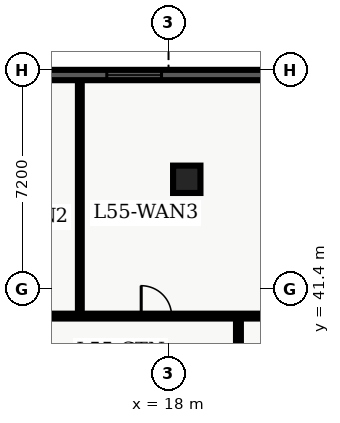
"""IFC4 building model, lengths in metres.
Left out: names, types, materials, properties, quantities, classifications, styles, units other than length and angle.
Written with IfcOpenShell. Run it as: python <this file> out.ifc"""

import sys

from ifc_helpers import new_model, entity, si_unit, converted_unit, direction, frame, origin_with_axes, origin_2d_with_axis, place, context, subcontext, project, spatial, polyline, rectangle, outline, extrude, element, fill, save


model = new_model("IFC4")
c1 = context("Model", 3, precision=1e-05, world=origin_with_axes(), true_north=direction((0.0, 1.0)))
c2 = subcontext(c1, "Body", "Model", "MODEL_VIEW")
j1 = project(units=[si_unit("LENGTHUNIT", "METRE"), converted_unit("PLANEANGLEUNIT", "DEGREE", entity("IfcPlaneAngleMeasure", 0.017), si_unit("PLANEANGLEUNIT", "RADIAN"), dimensions=[0, 0, 0, 0, 0, 0, 0])], contexts=[c1])
p1 = place(None, origin_with_axes())
s1 = spatial("IfcSite", under=j1, at=p1, CompositionType="ELEMENT")
p2 = place(p1, origin_with_axes())
s2 = spatial("IfcBuilding", under=s1, at=p2, CompositionType="ELEMENT")
p3 = place(p2, frame((0.0, 0.0, 224.7), z_axis=(0.0, 0.0, 1.0), x_axis=(1.0, 0.0, 0.0)))
s3 = spatial("IfcBuildingStorey", under=s2, at=p3, CompositionType="ELEMENT", Elevation=224.7)
p4 = place(p3, frame((18.6, 45.0, 0.0), z_axis=(0.0, 0.0, 1.0), x_axis=(1.0, 0.0, 0.0)))
e1 = element("IfcColumn", 1, at=p4, inside=s3, PredefinedType="COLUMN", context=c2, shape_type="SweptSolid", body=[
    extrude(rectangle(XDim=0.9, YDim=0.9, at=origin_2d_with_axis()), origin_with_axes(), (0.0, 0.0, 1.0), 3.9),
])
p5 = place(p3, frame((7.1, 40.5, 0.0), z_axis=(0.0, 0.0, 1.0), x_axis=(1.0, 0.0, 0.0)))
e2 = element("IfcWall", 2, at=p5, inside=s3, PredefinedType="PARTITIONING", context=c2, shape_type="SweptSolid", body=[
    extrude(outline(polyline([(0.0, -0.08), (24.965, -0.08), (24.965, 0.08), (0.0, 0.08), (0.0, -0.08)])), origin_with_axes(), (0.0, 0.0, 1.0), 2.7),
])
p6 = place(p5, frame((3.093, 0.0, 0.0), z_axis=(0.0, 0.0, 1.0), x_axis=(1.0, 0.0, 0.0)))
e3 = element("IfcOpeningElement", 3, at=p6, cuts=e2, PredefinedType="OPENING", context=c2, shape_type="SweptSolid", body=[
    extrude(rectangle(XDim=1.0, YDim=0.18, at=origin_2d_with_axis()), origin_with_axes(), (0.0, 0.0, 1.0), 2.15),
])
p7 = place(p5, frame((5.873, 0.0, 0.0), z_axis=(0.0, 0.0, 1.0), x_axis=(1.0, 0.0, 0.0)))
e4 = element("IfcOpeningElement", 4, at=p7, cuts=e2, PredefinedType="OPENING", context=c2, shape_type="SweptSolid", body=[
    extrude(rectangle(XDim=1.0, YDim=0.18, at=origin_2d_with_axis()), origin_with_axes(), (0.0, 0.0, 1.0), 2.15),
])
p8 = place(p5, frame((10.502, 0.0, 0.0), z_axis=(0.0, 0.0, 1.0), x_axis=(1.0, 0.0, 0.0)))
e5 = element("IfcOpeningElement", 5, at=p8, cuts=e2, PredefinedType="OPENING", context=c2, shape_type="SweptSolid", body=[
    extrude(rectangle(XDim=1.0, YDim=0.18, at=origin_2d_with_axis()), origin_with_axes(), (0.0, 0.0, 1.0), 2.15),
])
p9 = place(p3, frame((20.3, 7.8, 0.0), z_axis=(0.0, 0.0, 1.0), x_axis=(0.0, 1.0, 0.0)))
e6 = element("IfcWall", 6, at=p9, inside=s3, PredefinedType="PARTITIONING", context=c2, shape_type="SweptSolid", body=[
    extrude(outline(polyline([(0.0, -0.08), (32.7, -0.08), (32.7, 0.08), (0.0, 0.08), (0.0, -0.08)])), origin_with_axes(), (0.0, 0.0, 1.0), 2.7),
])
p10 = place(p9, frame((22.042, 0.0, 0.0), z_axis=(0.0, 0.0, 1.0), x_axis=(1.0, 0.0, 0.0)))
e7 = element("IfcOpeningElement", 7, at=p10, cuts=e6, PredefinedType="OPENING", context=c2, shape_type="SweptSolid", body=[
    extrude(rectangle(XDim=1.0, YDim=0.18, at=origin_2d_with_axis()), origin_with_axes(), (0.0, 0.0, 1.0), 2.15),
])
p11 = place(p9, frame((27.562, 0.0, 0.0), z_axis=(0.0, 0.0, 1.0), x_axis=(1.0, 0.0, 0.0)))
e8 = element("IfcOpeningElement", 8, at=p11, cuts=e6, PredefinedType="OPENING", context=c2, shape_type="SweptSolid", body=[
    extrude(rectangle(XDim=1.0, YDim=0.18, at=origin_2d_with_axis()), origin_with_axes(), (0.0, 0.0, 1.0), 2.15),
])
p12 = place(p9, frame((5.775, 0.0, 0.0), z_axis=(0.0, 0.0, 1.0), x_axis=(1.0, 0.0, 0.0)))
e9 = element("IfcOpeningElement", 9, at=p12, cuts=e6, PredefinedType="OPENING", context=c2, shape_type="SweptSolid", body=[
    extrude(rectangle(XDim=1.05, YDim=0.18, at=origin_2d_with_axis()), origin_with_axes(), (0.0, 0.0, 1.0), 2.15),
])
p13 = place(p3, frame((15.083, 40.6, 0.0), z_axis=(0.0, 0.0, 1.0), x_axis=(0.0, 1.0, 0.0)))
e10 = element("IfcWall", 10, at=p13, inside=s3, PredefinedType="PARTITIONING", context=c2, shape_type="SweptSolid", body=[
    extrude(outline(polyline([(0.0, -0.062), (7.665, -0.062), (7.665, 0.062), (0.0, 0.062), (0.0, -0.062)])), origin_with_axes(), (0.0, 0.0, 1.0), 2.7),
])
p14 = place(p3, frame((7.24, 48.43, 0.0), z_axis=(0.0, 0.0, 1.0), x_axis=(1.0, 0.0, 0.0)))
e11 = element("IfcWall", 11, at=p14, inside=s3, PredefinedType="SOLIDWALL", context=c2, shape_type="SweptSolid", body=[
    extrude(outline(polyline([(0.0, -0.17), (18.36, -0.17), (18.36, 0.17), (0.0, 0.17), (0.0, -0.17)])), origin_with_axes(), (0.0, 0.0, 1.0), 3.66),
])
p15 = place(p14, frame((9.63, 0.0, 0.45), z_axis=(0.0, 0.0, 1.0), x_axis=(1.0, 0.0, 0.0)))
e12 = element("IfcOpeningElement", 12, at=p15, cuts=e11, PredefinedType="OPENING", context=c2, shape_type="SweptSolid", body=[
    extrude(rectangle(XDim=1.8, YDim=0.36, at=origin_2d_with_axis()), origin_with_axes(), (0.0, 0.0, 1.0), 2.1),
])
p16 = place(p14, frame((14.9, 0.0, 0.45), z_axis=(0.0, 0.0, 1.0), x_axis=(1.0, 0.0, 0.0)))
e13 = element("IfcOpeningElement", 13, at=p16, cuts=e11, PredefinedType="OPENING", context=c2, shape_type="SweptSolid", body=[
    extrude(rectangle(XDim=1.8, YDim=0.36, at=origin_2d_with_axis()), origin_with_axes(), (0.0, 0.0, 1.0), 2.1),
])
p17 = place(p5, frame((10.502, 0.0, 0.0), z_axis=(0.0, 0.0, 1.0), x_axis=(1.0, 0.0, 0.0)))
e14 = element("IfcDoor", 14, at=p17, inside=s3, OperationType="SINGLE_SWING_LEFT", PredefinedType="DOOR", context=c2, shape_type="SweptSolid", body=[
    extrude(rectangle(XDim=1.0, YDim=0.09, at=origin_2d_with_axis()), origin_with_axes(), (0.0, 0.0, 1.0), 2.15),
])
fill(e5, e14)
p18 = place(p14, frame((9.63, 0.0, 0.45), z_axis=(0.0, 0.0, 1.0), x_axis=(1.0, 0.0, 0.0)))
e15 = element("IfcWindow", 15, at=p18, inside=s3, PredefinedType="WINDOW", context=c2, shape_type="SweptSolid", body=[
    extrude(rectangle(XDim=1.8, YDim=0.09, at=origin_2d_with_axis()), origin_with_axes(), (0.0, 0.0, 1.0), 2.1),
])
fill(e12, e15)
save(model, sys.argv[1])
